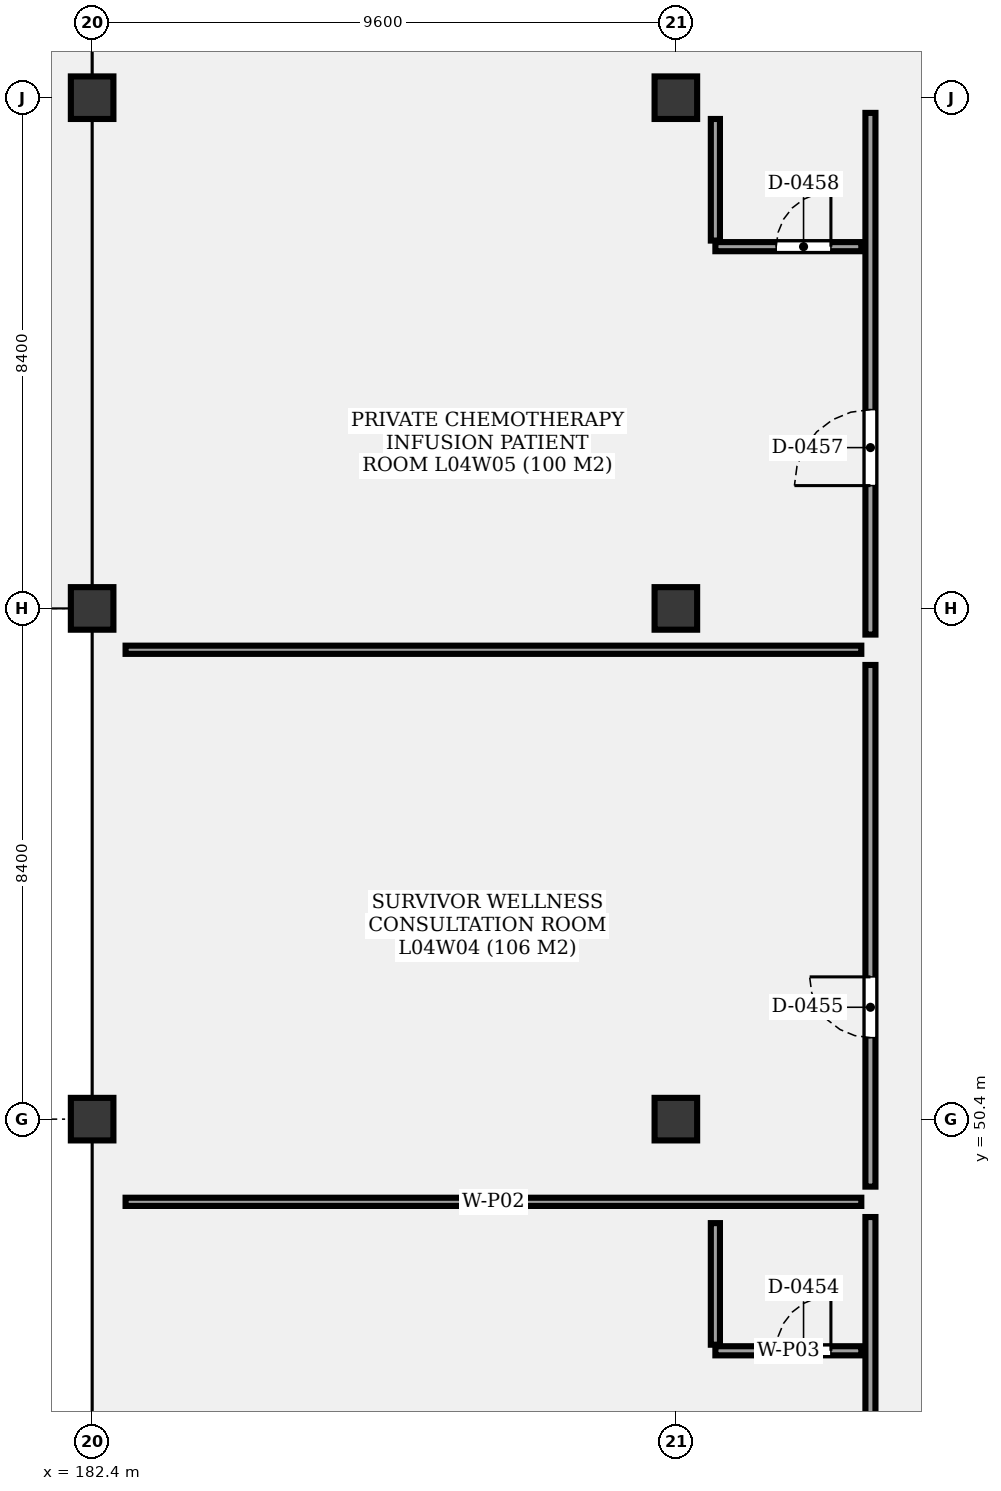
"""IFC4 building model, lengths in metres.
Left out: names, types, materials, properties, quantities, classifications, styles, units other than length and angle.
Written with IfcOpenShell. Run it as: python <this file> out.ifc"""

import sys

from ifc_helpers import new_model, si_unit, direction, frame, frame_2d, origin, origin_2d, place, context, subcontext, project, spatial, rectangle, extrude, element, fill, save


model = new_model("IFC4")
c1 = context("Model", 3, precision=1e-05, world=origin(), true_north=direction((0.0, 1.0)))
c2 = subcontext(c1, "Body", "Model", "MODEL_VIEW")
j1 = project(units=[si_unit("LENGTHUNIT", "METRE"), si_unit("PLANEANGLEUNIT", "RADIAN")], contexts=[c1])
p1 = place(None, origin())
s1 = spatial("IfcSite", under=j1, at=p1, CompositionType="ELEMENT")
p2 = place(p1, origin())
s2 = spatial("IfcBuilding", under=s1, at=p2, CompositionType="ELEMENT")
p3 = place(p2, frame((0.0, 0.0, 17.8)))
s3 = spatial("IfcBuildingStorey", under=s2, at=p3, CompositionType="ELEMENT", Elevation=17.8)
for number, where, z_axis, x_axis in (
    (1, (182.4, 50.4, 0.0), (0.0, 0.0, 1.0), (1.0, 0.0, 0.0)),
    (2, (182.4, 58.8, 0.0), (0.0, 0.0, 1.0), (1.0, 0.0, 0.0)),
    (3, (182.4, 67.2, 0.0), (0.0, 0.0, 1.0), (1.0, 0.0, 0.0)),
    (4, (192.0, 50.4, 0.0), (0.0, 0.0, 1.0), (1.0, 0.0, 0.0)),
    (5, (192.0, 58.8, 0.0), (0.0, 0.0, 1.0), (1.0, 0.0, 0.0)),
    (6, (192.0, 67.2, 0.0), (0.0, 0.0, 1.0), (1.0, 0.0, 0.0)),
):
    element("IfcColumn", number, at=place(p3, frame(where, z_axis=z_axis, x_axis=x_axis)), inside=s3, PredefinedType="COLUMN", context=c2, shape_type="SweptSolid", body=[
        extrude(rectangle(XDim=0.7, YDim=0.7, at=origin_2d()), origin(), (0.0, 0.0, 1.0), 4.2),
    ])
p4 = place(p3, frame((195.2, 40.21, 0.0), z_axis=(0.0, 0.0, 1.0), x_axis=(0.0, 1.0, 0.0)))
e7 = element("IfcWall", 7, at=p4, inside=s3, PredefinedType="PARTITIONING", context=c2, shape_type="SweptSolid", body=[
    extrude(rectangle(XDim=8.58, YDim=0.165, at=frame_2d((4.29, 0.0))), origin(), (0.0, 0.0, 1.0), 3.3),
])
p5 = place(p4, frame((2.45, 0.0, 0.0)))
e8 = element("IfcOpeningElement", 8, at=p5, cuts=e7, PredefinedType="OPENING", context=c2, shape_type="SweptSolid", body=[
    extrude(rectangle(XDim=1.25, YDim=2.2, at=frame_2d((0.625, 1.1))), frame((0.0, 0.093, 0.0), z_axis=(0.0, -1.0, 0.0), x_axis=(1.0, 0.0, 0.0)), (0.0, 0.0, 1.0), 0.185),
])
p6 = place(p3, frame((192.65, 46.59, 0.0), z_axis=(0.0, 0.0, 1.0), x_axis=(1.0, 0.0, 0.0)))
e9 = element("IfcWall", 9, at=p6, inside=s3, PredefinedType="PARTITIONING", context=c2, shape_type="SweptSolid", body=[
    extrude(rectangle(XDim=2.4, YDim=0.15, at=frame_2d((1.2, 0.0))), origin(), (0.0, 0.0, 1.0), 3.3),
])
p7 = place(p6, frame((1.0, 0.0, 0.0)))
e10 = element("IfcOpeningElement", 10, at=p7, cuts=e9, PredefinedType="OPENING", context=c2, shape_type="SweptSolid", body=[
    extrude(rectangle(XDim=0.9, YDim=2.1, at=frame_2d((0.45, 1.05))), frame((0.0, 0.085, 0.0), z_axis=(0.0, -1.0, 0.0), x_axis=(1.0, 0.0, 0.0)), (0.0, 0.0, 1.0), 0.17),
])
p8 = place(p3, frame((192.65, 46.69, 0.0), z_axis=(0.0, 0.0, 1.0), x_axis=(0.0, 1.0, 0.0)))
e11 = element("IfcWall", 11, at=p8, inside=s3, PredefinedType="PARTITIONING", context=c2, shape_type="SweptSolid", body=[
    extrude(rectangle(XDim=2.0, YDim=0.15, at=frame_2d((1.0, 0.0))), origin(), (0.0, 0.0, 1.0), 3.3),
])
p9 = place(p3, frame((195.2, 49.29, 0.0), z_axis=(0.0, 0.0, 1.0), x_axis=(0.0, 1.0, 0.0)))
e12 = element("IfcWall", 12, at=p9, inside=s3, PredefinedType="PARTITIONING", context=c2, shape_type="SweptSolid", body=[
    extrude(rectangle(XDim=8.58, YDim=0.165, at=frame_2d((4.29, 0.0))), origin(), (0.0, 0.0, 1.0), 3.3),
])
p10 = place(p9, frame((2.45, 0.0, 0.0)))
e13 = element("IfcOpeningElement", 13, at=p10, cuts=e12, PredefinedType="OPENING", context=c2, shape_type="SweptSolid", body=[
    extrude(rectangle(XDim=1.0, YDim=2.2, at=frame_2d((0.5, 1.1))), frame((0.0, 0.093, 0.0), z_axis=(0.0, -1.0, 0.0), x_axis=(1.0, 0.0, 0.0)), (0.0, 0.0, 1.0), 0.185),
])
p11 = place(p3, frame((182.95, 49.04, 0.0), z_axis=(0.0, 0.0, 1.0), x_axis=(1.0, 0.0, 0.0)))
e14 = element("IfcWall", 14, at=p11, inside=s3, PredefinedType="PARTITIONING", context=c2, shape_type="SweptSolid", body=[
    extrude(rectangle(XDim=12.1, YDim=0.135, at=frame_2d((6.05, 0.0))), origin(), (0.0, 0.0, 1.0), 3.3),
])
p12 = place(p3, frame((195.2, 58.37, 0.0), z_axis=(0.0, 0.0, 1.0), x_axis=(0.0, 1.0, 0.0)))
e15 = element("IfcWall", 15, at=p12, inside=s3, PredefinedType="PARTITIONING", context=c2, shape_type="SweptSolid", body=[
    extrude(rectangle(XDim=8.58, YDim=0.165, at=frame_2d((4.29, 0.0))), origin(), (0.0, 0.0, 1.0), 3.3),
])
p13 = place(p12, frame((2.45, 0.0, 0.0)))
e16 = element("IfcOpeningElement", 16, at=p13, cuts=e15, PredefinedType="OPENING", context=c2, shape_type="SweptSolid", body=[
    extrude(rectangle(XDim=1.25, YDim=2.2, at=frame_2d((0.625, 1.1))), frame((0.0, 0.093, 0.0), z_axis=(0.0, -1.0, 0.0), x_axis=(1.0, 0.0, 0.0)), (0.0, 0.0, 1.0), 0.185),
])
p14 = place(p3, frame((192.65, 64.75, 0.0), z_axis=(0.0, 0.0, 1.0), x_axis=(1.0, 0.0, 0.0)))
e17 = element("IfcWall", 17, at=p14, inside=s3, PredefinedType="PARTITIONING", context=c2, shape_type="SweptSolid", body=[
    extrude(rectangle(XDim=2.4, YDim=0.15, at=frame_2d((1.2, 0.0))), origin(), (0.0, 0.0, 1.0), 3.3),
])
p15 = place(p14, frame((1.0, 0.0, 0.0)))
e18 = element("IfcOpeningElement", 18, at=p15, cuts=e17, PredefinedType="OPENING", context=c2, shape_type="SweptSolid", body=[
    extrude(rectangle(XDim=0.9, YDim=2.1, at=frame_2d((0.45, 1.05))), frame((0.0, 0.085, 0.0), z_axis=(0.0, -1.0, 0.0), x_axis=(1.0, 0.0, 0.0)), (0.0, 0.0, 1.0), 0.17),
])
p16 = place(p3, frame((192.65, 64.85, 0.0), z_axis=(0.0, 0.0, 1.0), x_axis=(0.0, 1.0, 0.0)))
e19 = element("IfcWall", 19, at=p16, inside=s3, PredefinedType="PARTITIONING", context=c2, shape_type="SweptSolid", body=[
    extrude(rectangle(XDim=2.0, YDim=0.15, at=frame_2d((1.0, 0.0))), origin(), (0.0, 0.0, 1.0), 3.3),
])
p17 = place(p3, frame((182.95, 58.12, 0.0), z_axis=(0.0, 0.0, 1.0), x_axis=(1.0, 0.0, 0.0)))
e20 = element("IfcWall", 20, at=p17, inside=s3, PredefinedType="PARTITIONING", context=c2, shape_type="SweptSolid", body=[
    extrude(rectangle(XDim=12.1, YDim=0.135, at=frame_2d((6.05, 0.0))), origin(), (0.0, 0.0, 1.0), 3.3),
])
p18 = place(p7, origin())
e21 = element("IfcDoor", 21, at=p18, inside=s3, OperationType="SINGLE_SWING_RIGHT", PredefinedType="DOOR", context=c2, shape_type="SweptSolid", body=[
    extrude(rectangle(XDim=0.9, YDim=2.1, at=frame_2d((0.45, 1.05))), frame((0.0, 0.025, 0.0), z_axis=(0.0, -1.0, 0.0), x_axis=(1.0, 0.0, 0.0)), (0.0, 0.0, 1.0), 0.05),
])
fill(e10, e21)
p19 = place(p10, origin())
e22 = element("IfcDoor", 22, at=p19, inside=s3, OperationType="SINGLE_SWING_RIGHT", PredefinedType="DOOR", context=c2, shape_type="SweptSolid", body=[
    extrude(rectangle(XDim=1.0, YDim=2.2, at=frame_2d((0.5, 1.1))), frame((0.0, 0.025, 0.0), z_axis=(0.0, -1.0, 0.0), x_axis=(1.0, 0.0, 0.0)), (0.0, 0.0, 1.0), 0.05),
])
fill(e13, e22)
p20 = place(p13, origin())
e23 = element("IfcDoor", 23, at=p20, inside=s3, OperationType="SINGLE_SWING_LEFT", PredefinedType="DOOR", context=c2, shape_type="SweptSolid", body=[
    extrude(rectangle(XDim=1.25, YDim=2.2, at=frame_2d((0.625, 1.1))), frame((0.0, 0.025, 0.0), z_axis=(0.0, -1.0, 0.0), x_axis=(1.0, 0.0, 0.0)), (0.0, 0.0, 1.0), 0.05),
])
fill(e16, e23)
p21 = place(p15, origin())
e24 = element("IfcDoor", 24, at=p21, inside=s3, OperationType="SINGLE_SWING_RIGHT", PredefinedType="DOOR", context=c2, shape_type="SweptSolid", body=[
    extrude(rectangle(XDim=0.9, YDim=2.1, at=frame_2d((0.45, 1.05))), frame((0.0, 0.025, 0.0), z_axis=(0.0, -1.0, 0.0), x_axis=(1.0, 0.0, 0.0)), (0.0, 0.0, 1.0), 0.05),
])
fill(e18, e24)
save(model, sys.argv[1])
